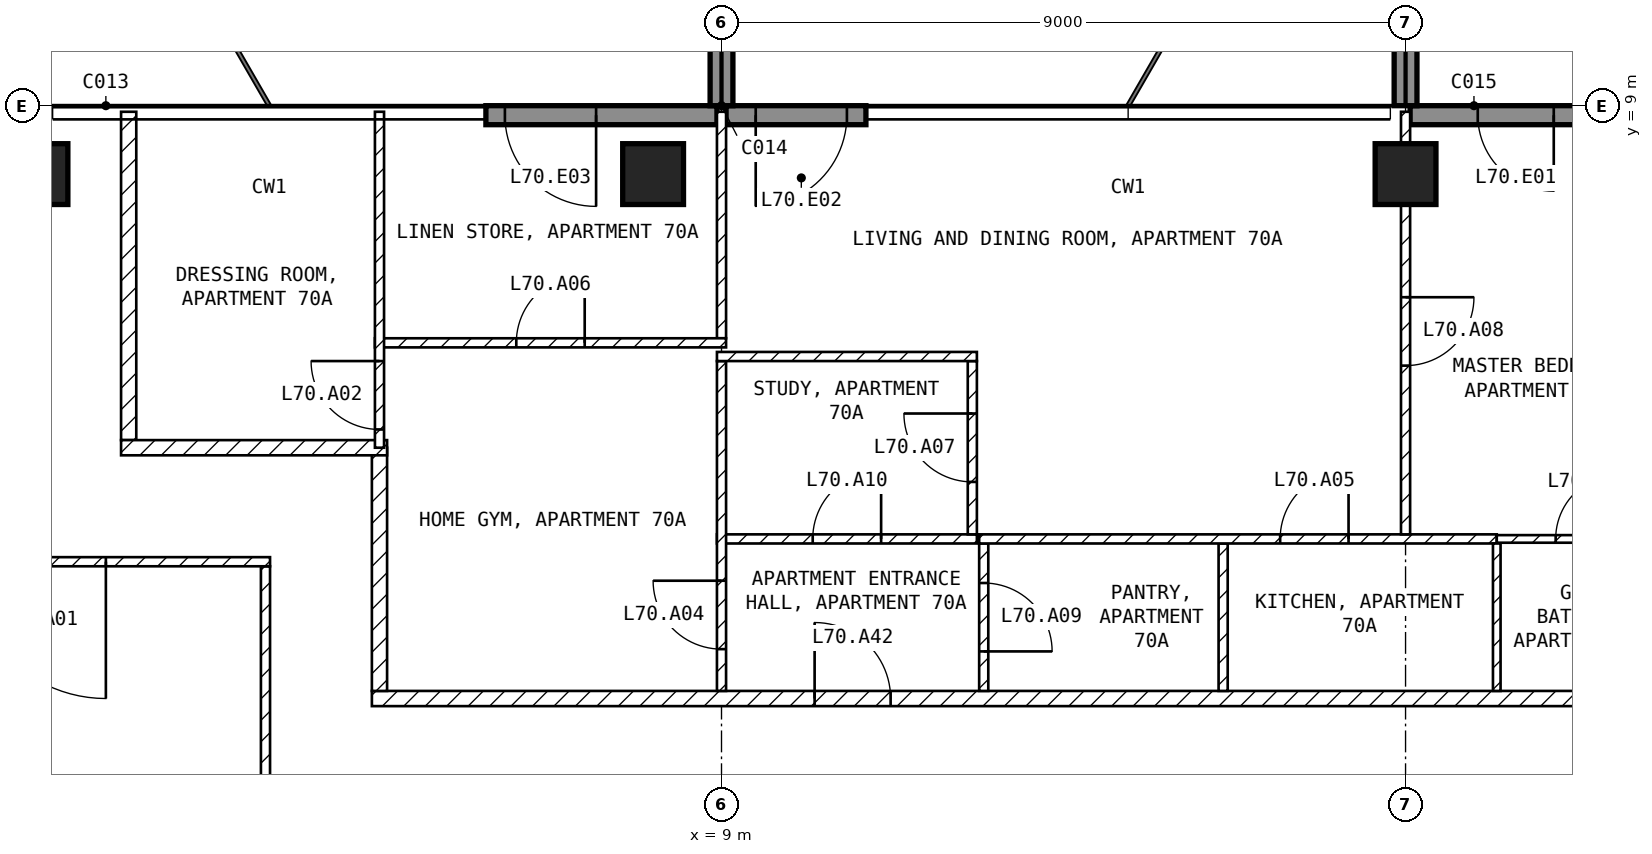
"""IFC4 building model, lengths in metres.
Left out: names, types, materials, properties, quantities, classifications, styles, units other than length and angle.
Written with IfcOpenShell. Run it as: python <this file> out.ifc"""

import sys

from ifc_helpers import new_model, si_unit, direction, frame, frame_2d, origin, origin_2d, place, context, subcontext, project, spatial, rectangle, extrude, element, fill, save


model = new_model("IFC4")
c1 = context("Model", 3, precision=1e-05, world=origin(), true_north=direction((0.0, 1.0)))
c2 = subcontext(c1, "Body", "Model", "MODEL_VIEW")
j1 = project(units=[si_unit("LENGTHUNIT", "METRE"), si_unit("PLANEANGLEUNIT", "RADIAN")], contexts=[c1])
p1 = place(None, origin())
s1 = spatial("IfcSite", under=j1, at=p1, CompositionType="ELEMENT")
p2 = place(p1, origin())
s2 = spatial("IfcBuilding", under=s1, at=p2, CompositionType="ELEMENT")
p3 = place(p2, frame((0.0, 0.0, 274.5)))
s3 = spatial("IfcBuildingStorey", under=s2, at=p3, CompositionType="ELEMENT", Elevation=274.5)
for number, where, z_axis, x_axis in (
    (1, (0.0, 8.1, -0.25), (0.0, 0.0, 1.0), (1.0, 0.0, 0.0)),
    (2, (8.1, 8.1, -0.25), (0.0, 0.0, 1.0), (1.0, 0.0, 0.0)),
    (3, (18.0, 8.1, -0.25), (0.0, 0.0, 1.0), (1.0, 0.0, 0.0)),
):
    element("IfcColumn", number, at=place(p3, frame(where, z_axis=z_axis, x_axis=x_axis)), inside=s3, PredefinedType="COLUMN", context=c2, shape_type="SweptSolid", body=[
        extrude(rectangle(XDim=0.8, YDim=0.8, at=origin_2d()), origin(), (0.0, 0.0, 1.0), 3.5),
    ])
p4 = place(p3, frame((21.1, 8.875, 0.0), z_axis=(0.0, 0.0, 1.0), x_axis=(-1.0, 0.0, 0.0)))
e4 = element("IfcWall", 4, at=p4, inside=s3, PredefinedType="SOLIDWALL", context=c2, shape_type="SweptSolid", body=[
    extrude(rectangle(XDim=3.04, YDim=0.25, at=frame_2d((1.52, 0.0))), origin(), (0.0, 0.0, 1.0), 3.25),
])
p5 = place(p4, frame((1.15, 0.0, 0.0)))
e5 = element("IfcOpeningElement", 5, at=p5, cuts=e4, PredefinedType="OPENING", context=c2, shape_type="SweptSolid", body=[
    extrude(rectangle(XDim=1.0, YDim=2.4, at=frame_2d((0.5, 1.2))), frame((0.0, 0.135, 0.0), z_axis=(0.0, -1.0, 0.0), x_axis=(1.0, 0.0, 0.0)), (0.0, 0.0, 1.0), 0.27),
])
p6 = place(p3, frame((10.9, 8.875, 0.0), z_axis=(0.0, 0.0, 1.0), x_axis=(-1.0, 0.0, 0.0)))
e6 = element("IfcWall", 6, at=p6, inside=s3, PredefinedType="SOLIDWALL", context=c2, shape_type="SweptSolid", body=[
    extrude(rectangle(XDim=1.84, YDim=0.25, at=frame_2d((0.92, 0.0))), origin(), (0.0, 0.0, 1.0), 3.25),
])
p7 = place(p6, frame((0.25, 0.0, 0.0)))
e7 = element("IfcOpeningElement", 7, at=p7, cuts=e6, PredefinedType="OPENING", context=c2, shape_type="SweptSolid", body=[
    extrude(rectangle(XDim=1.2, YDim=2.4, at=frame_2d((0.6, 1.2))), frame((0.0, 0.135, 0.0), z_axis=(0.0, -1.0, 0.0), x_axis=(1.0, 0.0, 0.0)), (0.0, 0.0, 1.0), 0.27),
])
p8 = place(p3, frame((8.94, 8.875, 0.0), z_axis=(0.0, 0.0, 1.0), x_axis=(-1.0, 0.0, 0.0)))
e8 = element("IfcWall", 8, at=p8, inside=s3, PredefinedType="SOLIDWALL", context=c2, shape_type="SweptSolid", body=[
    extrude(rectangle(XDim=3.04, YDim=0.25, at=frame_2d((1.52, 0.0))), origin(), (0.0, 0.0, 1.0), 3.25),
])
p9 = place(p8, frame((1.59, 0.0, 0.0)))
e9 = element("IfcOpeningElement", 9, at=p9, cuts=e8, PredefinedType="OPENING", context=c2, shape_type="SweptSolid", body=[
    extrude(rectangle(XDim=1.2, YDim=2.4, at=frame_2d((0.6, 1.2))), frame((0.0, 0.135, 0.0), z_axis=(0.0, -1.0, 0.0), x_axis=(1.0, 0.0, 0.0)), (0.0, 0.0, 1.0), 0.27),
])
for number, where, z_axis, x_axis in (
    (10, (9.0, 9.0, 0.0), (0.0, 0.0, 1.0), (0.0, 1.0, 0.0)),
    (11, (18.0, 9.0, 0.0), (0.0, 0.0, 1.0), (0.0, 1.0, 0.0)),
):
    element("IfcWall", number, at=place(p3, frame(where, z_axis=z_axis, x_axis=x_axis)), inside=s3, PredefinedType="SOLIDWALL", context=c2, shape_type="SweptSolid", body=[
        extrude(rectangle(XDim=2.7, YDim=0.3, at=frame_2d((1.35, 0.0))), origin(), (0.0, 0.0, 1.0), 3.25),
    ])
p10 = place(p3, frame((3.0, -2.94, 0.0), z_axis=(0.0, 0.0, 1.0), x_axis=(0.0, 1.0, 0.0)))
e12 = element("IfcWall", 12, at=p10, inside=s3, PredefinedType="PARTITIONING", context=c2, shape_type="SweptSolid", body=[
    extrude(rectangle(XDim=5.88, YDim=0.12, at=frame_2d((2.94, 0.0))), origin(), (0.0, 0.0, 1.0), 3.25),
])
p11 = place(p3, frame((3.06, 3.0, 0.0), z_axis=(0.0, 0.0, 1.0), x_axis=(-1.0, 0.0, 0.0)))
e13 = element("IfcWall", 13, at=p11, inside=s3, PredefinedType="PARTITIONING", context=c2, shape_type="SweptSolid", body=[
    extrude(rectangle(XDim=6.12, YDim=0.12, at=frame_2d((3.06, 0.0))), origin(), (0.0, 0.0, 1.0), 3.25),
])
p12 = place(p11, frame((2.16, 0.0, 0.0)))
e14 = element("IfcOpeningElement", 14, at=p12, cuts=e13, PredefinedType="OPENING", context=c2, shape_type="SweptSolid", body=[
    extrude(rectangle(XDim=1.8, YDim=2.1, at=frame_2d((0.9, 1.05))), frame((0.0, 0.07, 0.0), z_axis=(0.0, -1.0, 0.0), x_axis=(1.0, 0.0, 0.0)), (0.0, 0.0, 1.0), 0.14),
])
p13 = place(p3, frame((4.4, 1.2, 0.0), z_axis=(0.0, 0.0, 1.0), x_axis=(1.0, 0.0, 0.0)))
e15 = element("IfcWall", 15, at=p13, inside=s3, PredefinedType="PARTITIONING", context=c2, shape_type="SweptSolid", body=[
    extrude(rectangle(XDim=17.2, YDim=0.2, at=frame_2d((8.6, 0.0))), origin(), (0.0, 0.0, 1.0), 3.25),
])
p14 = place(p13, frame((5.825, 0.0, 0.0)))
e16 = element("IfcOpeningElement", 16, at=p14, cuts=e15, PredefinedType="OPENING", context=c2, shape_type="SweptSolid", body=[
    extrude(rectangle(XDim=1.0, YDim=2.1, at=frame_2d((0.5, 1.05))), frame((0.0, 0.11, 0.0), z_axis=(0.0, -1.0, 0.0), x_axis=(1.0, 0.0, 0.0)), (0.0, 0.0, 1.0), 0.22),
])
p15 = place(p3, frame((4.5, 4.5, 0.0), z_axis=(0.0, 0.0, 1.0), x_axis=(0.0, -1.0, 0.0)))
e17 = element("IfcWall", 17, at=p15, inside=s3, PredefinedType="PARTITIONING", context=c2, shape_type="SweptSolid", body=[
    extrude(rectangle(XDim=3.2, YDim=0.2, at=frame_2d((1.6, 0.0))), origin(), (0.0, 0.0, 1.0), 3.25),
])
p16 = place(p3, frame((1.2, 8.92, 0.0), z_axis=(0.0, 0.0, 1.0), x_axis=(0.0, -1.0, 0.0)))
e18 = element("IfcWall", 18, at=p16, inside=s3, PredefinedType="PARTITIONING", context=c2, shape_type="SweptSolid", body=[
    extrude(rectangle(XDim=4.32, YDim=0.2, at=frame_2d((2.16, 0.0))), origin(), (0.0, 0.0, 1.0), 3.25),
])
p17 = place(p3, frame((1.1, 4.5, 0.0), z_axis=(0.0, 0.0, 1.0), x_axis=(1.0, 0.0, 0.0)))
e19 = element("IfcWall", 19, at=p17, inside=s3, PredefinedType="PARTITIONING", context=c2, shape_type="SweptSolid", body=[
    extrude(rectangle(XDim=3.5, YDim=0.2, at=frame_2d((1.75, 0.0))), origin(), (0.0, 0.0, 1.0), 3.25),
])
p18 = place(p3, frame((12.45, 3.24, 0.0), z_axis=(0.0, 0.0, 1.0), x_axis=(0.0, -1.0, 0.0)))
e20 = element("IfcWall", 20, at=p18, inside=s3, PredefinedType="PARTITIONING", context=c2, shape_type="SweptSolid", body=[
    extrude(rectangle(XDim=1.94, YDim=0.12, at=frame_2d((0.97, 0.0))), origin(), (0.0, 0.0, 1.0), 3.25),
])
p19 = place(p18, frame((0.52, 0.0, 0.0)))
e21 = element("IfcOpeningElement", 21, at=p19, cuts=e20, PredefinedType="OPENING", context=c2, shape_type="SweptSolid", body=[
    extrude(rectangle(XDim=0.9, YDim=2.1, at=frame_2d((0.45, 1.05))), frame((0.0, 0.07, 0.0), z_axis=(0.0, -1.0, 0.0), x_axis=(1.0, 0.0, 0.0)), (0.0, 0.0, 1.0), 0.14),
])
p20 = place(p3, frame((8.94, 3.3, 0.0), z_axis=(0.0, 0.0, 1.0), x_axis=(1.0, 0.0, 0.0)))
e22 = element("IfcWall", 22, at=p20, inside=s3, PredefinedType="PARTITIONING", context=c2, shape_type="SweptSolid", body=[
    extrude(rectangle(XDim=3.42, YDim=0.12, at=frame_2d((1.71, 0.0))), origin(), (0.0, 0.0, 1.0), 3.25),
])
p21 = place(p20, frame((1.26, 0.0, 0.0)))
e23 = element("IfcOpeningElement", 23, at=p21, cuts=e22, PredefinedType="OPENING", context=c2, shape_type="SweptSolid", body=[
    extrude(rectangle(XDim=0.9, YDim=2.1, at=frame_2d((0.45, 1.05))), frame((0.0, 0.07, 0.0), z_axis=(0.0, -1.0, 0.0), x_axis=(1.0, 0.0, 0.0)), (0.0, 0.0, 1.0), 0.14),
])
p22 = place(p3, frame((9.0, 1.3, 0.0), z_axis=(0.0, 0.0, 1.0), x_axis=(0.0, 1.0, 0.0)))
e24 = element("IfcWall", 24, at=p22, inside=s3, PredefinedType="PARTITIONING", context=c2, shape_type="SweptSolid", body=[
    extrude(rectangle(XDim=4.34, YDim=0.12, at=frame_2d((2.17, 0.0))), origin(), (0.0, 0.0, 1.0), 3.25),
])
p23 = place(p22, frame((0.55, 0.0, 0.0)))
e25 = element("IfcOpeningElement", 25, at=p23, cuts=e24, PredefinedType="OPENING", context=c2, shape_type="SweptSolid", body=[
    extrude(rectangle(XDim=0.9, YDim=2.1, at=frame_2d((0.45, 1.05))), frame((0.0, 0.07, 0.0), z_axis=(0.0, -1.0, 0.0), x_axis=(1.0, 0.0, 0.0)), (0.0, 0.0, 1.0), 0.14),
])
p24 = place(p3, frame((15.6, 3.24, 0.0), z_axis=(0.0, 0.0, 1.0), x_axis=(0.0, -1.0, 0.0)))
e26 = element("IfcWall", 26, at=p24, inside=s3, PredefinedType="PARTITIONING", context=c2, shape_type="SweptSolid", body=[
    extrude(rectangle(XDim=1.94, YDim=0.12, at=frame_2d((0.97, 0.0))), origin(), (0.0, 0.0, 1.0), 3.25),
])
p25 = place(p3, frame((12.39, 3.3, 0.0), z_axis=(0.0, 0.0, 1.0), x_axis=(1.0, 0.0, 0.0)))
e27 = element("IfcWall", 27, at=p25, inside=s3, PredefinedType="PARTITIONING", context=c2, shape_type="SweptSolid", body=[
    extrude(rectangle(XDim=6.81, YDim=0.12, at=frame_2d((3.405, 0.0))), origin(), (0.0, 0.0, 1.0), 3.25),
])
p26 = place(p25, frame((3.96, 0.0, 0.0)))
e28 = element("IfcOpeningElement", 28, at=p26, cuts=e27, PredefinedType="OPENING", context=c2, shape_type="SweptSolid", body=[
    extrude(rectangle(XDim=0.9, YDim=2.1, at=frame_2d((0.45, 1.05))), frame((0.0, 0.07, 0.0), z_axis=(0.0, -1.0, 0.0), x_axis=(1.0, 0.0, 0.0)), (0.0, 0.0, 1.0), 0.14),
])
p27 = place(p3, frame((19.2, 3.24, 0.0), z_axis=(0.0, 0.0, 1.0), x_axis=(0.0, -1.0, 0.0)))
e29 = element("IfcWall", 29, at=p27, inside=s3, PredefinedType="PARTITIONING", context=c2, shape_type="SweptSolid", body=[
    extrude(rectangle(XDim=1.94, YDim=0.1, at=frame_2d((0.97, 0.0))), origin(), (0.0, 0.0, 1.0), 3.25),
])
p28 = place(p3, frame((19.2, 3.3, 0.0), z_axis=(0.0, 0.0, 1.0), x_axis=(1.0, 0.0, 0.0)))
e30 = element("IfcWall", 30, at=p28, inside=s3, PredefinedType="PARTITIONING", context=c2, shape_type="SweptSolid", body=[
    extrude(rectangle(XDim=2.4, YDim=0.1, at=frame_2d((1.2, 0.0))), origin(), (0.0, 0.0, 1.0), 3.25),
])
p29 = place(p28, frame((0.775, 0.0, 0.0)))
e31 = element("IfcOpeningElement", 31, at=p29, cuts=e30, PredefinedType="OPENING", context=c2, shape_type="SweptSolid", body=[
    extrude(rectangle(XDim=0.85, YDim=2.1, at=frame_2d((0.425, 1.05))), frame((0.0, 0.06, 0.0), z_axis=(0.0, -1.0, 0.0), x_axis=(1.0, 0.0, 0.0)), (0.0, 0.0, 1.0), 0.12),
])
p30 = place(p3, frame((12.3, 3.36, 0.0), z_axis=(0.0, 0.0, 1.0), x_axis=(0.0, 1.0, 0.0)))
e32 = element("IfcWall", 32, at=p30, inside=s3, PredefinedType="PARTITIONING", context=c2, shape_type="SweptSolid", body=[
    extrude(rectangle(XDim=2.28, YDim=0.12, at=frame_2d((1.14, 0.0))), origin(), (0.0, 0.0, 1.0), 3.25),
])
p31 = place(p30, frame((0.69, 0.0, 0.0)))
e33 = element("IfcOpeningElement", 33, at=p31, cuts=e32, PredefinedType="OPENING", context=c2, shape_type="SweptSolid", body=[
    extrude(rectangle(XDim=0.9, YDim=2.1, at=frame_2d((0.45, 1.05))), frame((0.0, 0.07, 0.0), z_axis=(0.0, -1.0, 0.0), x_axis=(1.0, 0.0, 0.0)), (0.0, 0.0, 1.0), 0.14),
])
p32 = place(p3, frame((12.36, 5.7, 0.0), z_axis=(0.0, 0.0, 1.0), x_axis=(-1.0, 0.0, 0.0)))
e34 = element("IfcWall", 34, at=p32, inside=s3, PredefinedType="PARTITIONING", context=c2, shape_type="SweptSolid", body=[
    extrude(rectangle(XDim=3.42, YDim=0.12, at=frame_2d((1.71, 0.0))), origin(), (0.0, 0.0, 1.0), 3.25),
])
p33 = place(p3, frame((18.0, 8.92, 0.0), z_axis=(0.0, 0.0, 1.0), x_axis=(0.0, -1.0, 0.0)))
e35 = element("IfcWall", 35, at=p33, inside=s3, PredefinedType="PARTITIONING", context=c2, shape_type="SweptSolid", body=[
    extrude(rectangle(XDim=5.56, YDim=0.12, at=frame_2d((2.78, 0.0))), origin(), (0.0, 0.0, 1.0), 2.496),
])
p34 = place(p33, frame((2.44, 0.0, 0.0)))
e36 = element("IfcOpeningElement", 36, at=p34, cuts=e35, PredefinedType="OPENING", context=c2, shape_type="SweptSolid", body=[
    extrude(rectangle(XDim=0.9, YDim=2.1, at=frame_2d((0.45, 1.05))), frame((0.0, 0.07, 0.0), z_axis=(0.0, -1.0, 0.0), x_axis=(1.0, 0.0, 0.0)), (0.0, 0.0, 1.0), 0.14),
])
p35 = place(p3, frame((9.0, 5.94, 0.0), z_axis=(0.0, 0.0, 1.0), x_axis=(0.0, 1.0, 0.0)))
e37 = element("IfcWall", 37, at=p35, inside=s3, PredefinedType="PARTITIONING", context=c2, shape_type="SweptSolid", body=[
    extrude(rectangle(XDim=2.98, YDim=0.12, at=frame_2d((1.49, 0.0))), origin(), (0.0, 0.0, 1.0), 3.25),
])
p36 = place(p3, frame((4.44, 5.88, 0.0), z_axis=(0.0, 0.0, 1.0), x_axis=(1.0, 0.0, 0.0)))
e38 = element("IfcWall", 38, at=p36, inside=s3, PredefinedType="PARTITIONING", context=c2, shape_type="SweptSolid", body=[
    extrude(rectangle(XDim=4.62, YDim=0.12, at=frame_2d((2.31, 0.0))), origin(), (0.0, 0.0, 1.0), 3.25),
])
p37 = place(p36, frame((1.86, 0.0, 0.0)))
e39 = element("IfcOpeningElement", 39, at=p37, cuts=e38, PredefinedType="OPENING", context=c2, shape_type="SweptSolid", body=[
    extrude(rectangle(XDim=0.9, YDim=2.1, at=frame_2d((0.45, 1.05))), frame((0.0, 0.07, 0.0), z_axis=(0.0, -1.0, 0.0), x_axis=(1.0, 0.0, 0.0)), (0.0, 0.0, 1.0), 0.14),
])
p38 = place(p3, frame((4.5, 4.5, 0.0), z_axis=(0.0, 0.0, 1.0), x_axis=(0.0, 1.0, 0.0)))
e40 = element("IfcWall", 40, at=p38, inside=s3, PredefinedType="PARTITIONING", context=c2, shape_type="SweptSolid", body=[
    extrude(rectangle(XDim=4.42, YDim=0.12, at=frame_2d((2.21, 0.0))), origin(), (0.0, 0.0, 1.0), 3.25),
])
p39 = place(p38, frame((0.24, 0.0, 0.0)))
e41 = element("IfcOpeningElement", 41, at=p39, cuts=e40, PredefinedType="OPENING", context=c2, shape_type="SweptSolid", body=[
    extrude(rectangle(XDim=0.9, YDim=2.1, at=frame_2d((0.45, 1.05))), frame((0.0, 0.07, 0.0), z_axis=(0.0, -1.0, 0.0), x_axis=(1.0, 0.0, 0.0)), (0.0, 0.0, 1.0), 0.14),
])
p40 = place(p5, origin())
e42 = element("IfcDoor", 42, at=p40, inside=s3, OperationType="SINGLE_SWING_LEFT", PredefinedType="DOOR", context=c2, shape_type="SweptSolid", body=[
    extrude(rectangle(XDim=1.0, YDim=2.4, at=frame_2d((0.5, 1.2))), frame((0.0, 0.025, 0.0), z_axis=(0.0, -1.0, 0.0), x_axis=(1.0, 0.0, 0.0)), (0.0, 0.0, 1.0), 0.05),
])
fill(e5, e42)
p41 = place(p7, origin())
e43 = element("IfcDoor", 43, at=p41, inside=s3, OperationType="SINGLE_SWING_RIGHT", PredefinedType="DOOR", context=c2, shape_type="SweptSolid", body=[
    extrude(rectangle(XDim=1.2, YDim=2.4, at=frame_2d((0.6, 1.2))), frame((0.0, 0.025, 0.0), z_axis=(0.0, -1.0, 0.0), x_axis=(1.0, 0.0, 0.0)), (0.0, 0.0, 1.0), 0.05),
])
fill(e7, e43)
p42 = place(p9, origin())
e44 = element("IfcDoor", 44, at=p42, inside=s3, OperationType="SINGLE_SWING_LEFT", PredefinedType="DOOR", context=c2, shape_type="SweptSolid", body=[
    extrude(rectangle(XDim=1.2, YDim=2.4, at=frame_2d((0.6, 1.2))), frame((0.0, 0.025, 0.0), z_axis=(0.0, -1.0, 0.0), x_axis=(1.0, 0.0, 0.0)), (0.0, 0.0, 1.0), 0.05),
])
fill(e9, e44)
p43 = place(p12, origin())
e45 = element("IfcDoor", 45, at=p43, inside=s3, OperationType="SINGLE_SWING_LEFT", PredefinedType="DOOR", context=c2, shape_type="SweptSolid", body=[
    extrude(rectangle(XDim=1.8, YDim=2.1, at=frame_2d((0.9, 1.05))), frame((0.0, 0.025, 0.0), z_axis=(0.0, -1.0, 0.0), x_axis=(1.0, 0.0, 0.0)), (0.0, 0.0, 1.0), 0.05),
])
fill(e14, e45)
p44 = place(p39, origin())
e46 = element("IfcDoor", 46, at=p44, inside=s3, OperationType="SINGLE_SWING_RIGHT", PredefinedType="DOOR", context=c2, shape_type="SweptSolid", body=[
    extrude(rectangle(XDim=0.9, YDim=2.1, at=frame_2d((0.45, 1.05))), frame((0.0, 0.025, 0.0), z_axis=(0.0, -1.0, 0.0), x_axis=(1.0, 0.0, 0.0)), (0.0, 0.0, 1.0), 0.05),
])
fill(e41, e46)
p45 = place(p29, origin())
e47 = element("IfcDoor", 47, at=p45, inside=s3, OperationType="SINGLE_SWING_RIGHT", PredefinedType="DOOR", context=c2, shape_type="SweptSolid", body=[
    extrude(rectangle(XDim=0.85, YDim=2.1, at=frame_2d((0.425, 1.05))), frame((0.0, 0.025, 0.0), z_axis=(0.0, -1.0, 0.0), x_axis=(1.0, 0.0, 0.0)), (0.0, 0.0, 1.0), 0.05),
])
fill(e31, e47)
p46 = place(p23, origin())
e48 = element("IfcDoor", 48, at=p46, inside=s3, OperationType="SINGLE_SWING_RIGHT", PredefinedType="DOOR", context=c2, shape_type="SweptSolid", body=[
    extrude(rectangle(XDim=0.9, YDim=2.1, at=frame_2d((0.45, 1.05))), frame((0.0, 0.025, 0.0), z_axis=(0.0, -1.0, 0.0), x_axis=(1.0, 0.0, 0.0)), (0.0, 0.0, 1.0), 0.05),
])
fill(e25, e48)
p47 = place(p26, origin())
e49 = element("IfcDoor", 49, at=p47, inside=s3, OperationType="SINGLE_SWING_RIGHT", PredefinedType="DOOR", context=c2, shape_type="SweptSolid", body=[
    extrude(rectangle(XDim=0.9, YDim=2.1, at=frame_2d((0.45, 1.05))), frame((0.0, 0.025, 0.0), z_axis=(0.0, -1.0, 0.0), x_axis=(1.0, 0.0, 0.0)), (0.0, 0.0, 1.0), 0.05),
])
fill(e28, e49)
p48 = place(p37, origin())
e50 = element("IfcDoor", 50, at=p48, inside=s3, OperationType="SINGLE_SWING_RIGHT", PredefinedType="DOOR", context=c2, shape_type="SweptSolid", body=[
    extrude(rectangle(XDim=0.9, YDim=2.1, at=frame_2d((0.45, 1.05))), frame((0.0, 0.025, 0.0), z_axis=(0.0, -1.0, 0.0), x_axis=(1.0, 0.0, 0.0)), (0.0, 0.0, 1.0), 0.05),
])
fill(e39, e50)
p49 = place(p31, origin())
e51 = element("IfcDoor", 51, at=p49, inside=s3, OperationType="SINGLE_SWING_RIGHT", PredefinedType="DOOR", context=c2, shape_type="SweptSolid", body=[
    extrude(rectangle(XDim=0.9, YDim=2.1, at=frame_2d((0.45, 1.05))), frame((0.0, 0.025, 0.0), z_axis=(0.0, -1.0, 0.0), x_axis=(1.0, 0.0, 0.0)), (0.0, 0.0, 1.0), 0.05),
])
fill(e33, e51)
p50 = place(p34, origin())
e52 = element("IfcDoor", 52, at=p50, inside=s3, OperationType="SINGLE_SWING_LEFT", PredefinedType="DOOR", context=c2, shape_type="SweptSolid", body=[
    extrude(rectangle(XDim=0.9, YDim=2.1, at=frame_2d((0.45, 1.05))), frame((0.0, 0.025, 0.0), z_axis=(0.0, -1.0, 0.0), x_axis=(1.0, 0.0, 0.0)), (0.0, 0.0, 1.0), 0.05),
])
fill(e36, e52)
p51 = place(p19, origin())
e53 = element("IfcDoor", 53, at=p51, inside=s3, OperationType="SINGLE_SWING_RIGHT", PredefinedType="DOOR", context=c2, shape_type="SweptSolid", body=[
    extrude(rectangle(XDim=0.9, YDim=2.1, at=frame_2d((0.45, 1.05))), frame((0.0, 0.025, 0.0), z_axis=(0.0, -1.0, 0.0), x_axis=(1.0, 0.0, 0.0)), (0.0, 0.0, 1.0), 0.05),
])
fill(e21, e53)
p52 = place(p21, origin())
e54 = element("IfcDoor", 54, at=p52, inside=s3, OperationType="SINGLE_SWING_RIGHT", PredefinedType="DOOR", context=c2, shape_type="SweptSolid", body=[
    extrude(rectangle(XDim=0.9, YDim=2.1, at=frame_2d((0.45, 1.05))), frame((0.0, 0.025, 0.0), z_axis=(0.0, -1.0, 0.0), x_axis=(1.0, 0.0, 0.0)), (0.0, 0.0, 1.0), 0.05),
])
fill(e23, e54)
p53 = place(p14, origin())
e55 = element("IfcDoor", 55, at=p53, inside=s3, OperationType="SINGLE_SWING_LEFT", PredefinedType="DOOR", context=c2, shape_type="SweptSolid", body=[
    extrude(rectangle(XDim=1.0, YDim=2.1, at=frame_2d((0.5, 1.05))), frame((0.0, 0.025, 0.0), z_axis=(0.0, -1.0, 0.0), x_axis=(1.0, 0.0, 0.0)), (0.0, 0.0, 1.0), 0.05),
])
fill(e16, e55)
save(model, sys.argv[1])
